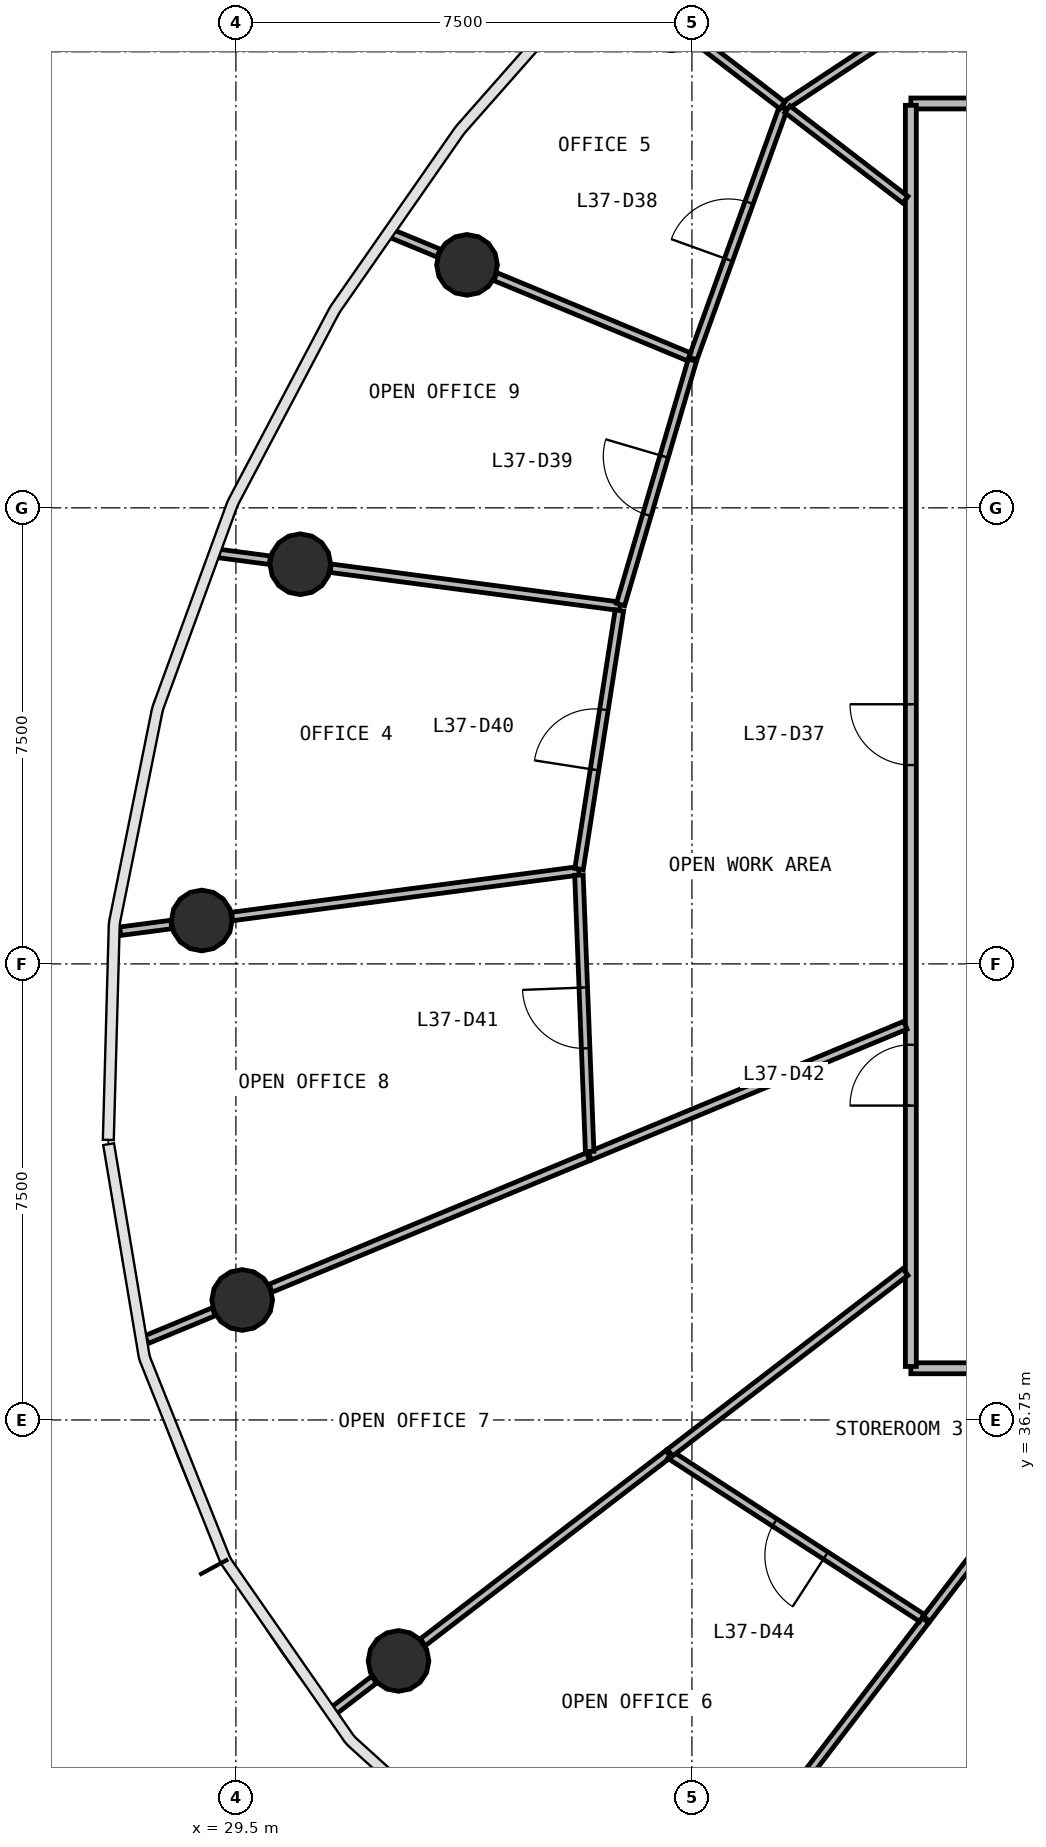
"""IFC4 building model, lengths in metres.
Left out: names, types, materials, properties, quantities, classifications, styles, units other than length and angle.
Written with IfcOpenShell. Run it as: python <this file> out.ifc"""

import sys

from ifc_helpers import new_model, si_unit, direction, frame, frame_2d, origin, origin_2d, place, context, subcontext, project, spatial, rectangle, circle, extrude, source, transform, mapped, element, fill, save


model = new_model("IFC4")
c1 = context("Model", 3, precision=1e-05, world=origin(), true_north=direction((0.0, 1.0)))
c2 = subcontext(c1, "Body", "Model", "MODEL_VIEW")
j1 = project(units=[si_unit("LENGTHUNIT", "METRE"), si_unit("PLANEANGLEUNIT", "RADIAN")], contexts=[c1])
p1 = place(None, origin())
s1 = spatial("IfcSite", under=j1, at=p1, CompositionType="ELEMENT")
p2 = place(p1, origin())
s2 = spatial("IfcBuilding", under=s1, at=p2, CompositionType="ELEMENT")
p3 = place(p2, frame((0.0, 0.0, 156.5)))
s3 = spatial("IfcBuildingStorey", under=s2, at=p3, CompositionType="ELEMENT", Elevation=156.5)
m1 = source(origin(), c2, "Body", "SweptSolid", [
    extrude(circle(Radius=0.5, at=origin_2d()), origin(), (0.0, 0.0, 1.0), 3.9),
])
for number, where, z_axis, x_axis in (
    (1, (33.301, 55.746, 0.0), (0.0, 0.0, 1.0), (1.0, 0.0, 0.0)),
    (2, (30.559, 50.823, 0.0), (0.0, 0.0, 1.0), (1.0, 0.0, 0.0)),
    (3, (28.938, 44.964, 0.0), (0.0, 0.0, 1.0), (1.0, 0.0, 0.0)),
    (4, (29.603, 38.723, 0.0), (0.0, 0.0, 1.0), (1.0, 0.0, 0.0)),
    (5, (32.174, 32.787, 0.0), (0.0, 0.0, 1.0), (1.0, 0.0, 0.0)),
):
    element("IfcColumn", number, at=place(p3, frame(where, z_axis=z_axis, x_axis=x_axis)), inside=s3, PredefinedType="COLUMN", context=c2, shape_type="MappedRepresentation", body=[
        mapped(m1, transform((0.0, 0.0, 0.0), scale=1.0)),
    ])
p4 = place(p3, frame((40.6, 58.4, 0.0), z_axis=(0.0, 0.0, 1.0), x_axis=(1.0, 0.0, 0.0)))
e6 = element("IfcWall", 6, at=p4, inside=s3, PredefinedType="PARTITIONING", context=c2, shape_type="SweptSolid", body=[
    extrude(rectangle(XDim=22.8, YDim=0.18, at=frame_2d((11.4, 0.0))), origin(), (0.0, 0.0, 1.0), 2.88),
])
p5 = place(p4, frame((12.95, 0.0, 0.0)))
e7 = element("IfcOpeningElement", 7, at=p5, cuts=e6, PredefinedType="OPENING", context=c2, shape_type="SweptSolid", body=[
    extrude(rectangle(XDim=1.0, YDim=2.1, at=frame_2d((0.5, 1.05))), frame((0.0, 0.1, 0.0), z_axis=(0.0, -1.0, 0.0), x_axis=(1.0, 0.0, 0.0)), (0.0, 0.0, 1.0), 0.2),
])
p6 = place(p4, frame((10.95, 0.0, 0.0)))
e8 = element("IfcOpeningElement", 8, at=p6, cuts=e6, PredefinedType="OPENING", context=c2, shape_type="SweptSolid", body=[
    extrude(rectangle(XDim=1.0, YDim=2.1, at=frame_2d((0.5, 1.05))), frame((0.0, 0.1, 0.0), z_axis=(0.0, -1.0, 0.0), x_axis=(1.0, 0.0, 0.0)), (0.0, 0.0, 1.0), 0.2),
])
p7 = place(p3, frame((63.4, 37.6, 0.0), z_axis=(0.0, 0.0, 1.0), x_axis=(-1.0, 0.0, 0.0)))
e9 = element("IfcWall", 9, at=p7, inside=s3, PredefinedType="PARTITIONING", context=c2, shape_type="SweptSolid", body=[
    extrude(rectangle(XDim=22.8, YDim=0.18, at=frame_2d((11.4, 0.0))), origin(), (0.0, 0.0, 1.0), 2.88),
])
p8 = place(p7, frame((16.05, 0.0, 0.0)))
e10 = element("IfcOpeningElement", 10, at=p8, cuts=e9, PredefinedType="OPENING", context=c2, shape_type="SweptSolid", body=[
    extrude(rectangle(XDim=0.9, YDim=2.1, at=frame_2d((0.45, 1.05))), frame((0.0, 0.1, 0.0), z_axis=(0.0, -1.0, 0.0), x_axis=(1.0, 0.0, 0.0)), (0.0, 0.0, 1.0), 0.2),
])
p9 = place(p7, frame((13.05, 0.0, 0.0)))
e11 = element("IfcOpeningElement", 11, at=p9, cuts=e9, PredefinedType="OPENING", context=c2, shape_type="SweptSolid", body=[
    extrude(rectangle(XDim=0.9, YDim=2.1, at=frame_2d((0.45, 1.05))), frame((0.0, 0.1, 0.0), z_axis=(0.0, -1.0, 0.0), x_axis=(1.0, 0.0, 0.0)), (0.0, 0.0, 1.0), 0.2),
])
p10 = place(p7, frame((10.95, 0.0, 0.0)))
e12 = element("IfcOpeningElement", 12, at=p10, cuts=e9, PredefinedType="OPENING", context=c2, shape_type="SweptSolid", body=[
    extrude(rectangle(XDim=1.0, YDim=2.1, at=frame_2d((0.5, 1.05))), frame((0.0, 0.1, 0.0), z_axis=(0.0, -1.0, 0.0), x_axis=(1.0, 0.0, 0.0)), (0.0, 0.0, 1.0), 0.2),
])
p11 = place(p7, frame((19.95, 0.0, 0.0)))
e13 = element("IfcOpeningElement", 13, at=p11, cuts=e9, PredefinedType="OPENING", context=c2, shape_type="SweptSolid", body=[
    extrude(rectangle(XDim=1.0, YDim=2.1, at=frame_2d((0.5, 1.05))), frame((0.0, 0.1, 0.0), z_axis=(0.0, -1.0, 0.0), x_axis=(1.0, 0.0, 0.0)), (0.0, 0.0, 1.0), 0.2),
])
p12 = place(p3, frame((40.6, 37.63, 0.0), z_axis=(0.0, 0.0, 1.0), x_axis=(0.0, 1.0, 0.0)))
e14 = element("IfcWall", 14, at=p12, inside=s3, PredefinedType="PARTITIONING", context=c2, shape_type="SweptSolid", body=[
    extrude(rectangle(XDim=20.74, YDim=0.18, at=frame_2d((10.37, 0.0))), origin(), (0.0, 0.0, 1.0), 2.88),
])
p13 = place(p12, frame((9.89, 0.0, 0.0)))
e15 = element("IfcOpeningElement", 15, at=p13, cuts=e14, PredefinedType="OPENING", context=c2, shape_type="SweptSolid", body=[
    extrude(rectangle(XDim=1.0, YDim=2.1, at=frame_2d((0.5, 1.05))), frame((0.0, 0.1, 0.0), z_axis=(0.0, -1.0, 0.0), x_axis=(1.0, 0.0, 0.0)), (0.0, 0.0, 1.0), 0.2),
])
p14 = place(p12, frame((4.29, 0.0, 0.0)))
e16 = element("IfcOpeningElement", 16, at=p14, cuts=e14, PredefinedType="OPENING", context=c2, shape_type="SweptSolid", body=[
    extrude(rectangle(XDim=1.0, YDim=2.1, at=frame_2d((0.5, 1.05))), frame((0.0, 0.1, 0.0), z_axis=(0.0, -1.0, 0.0), x_axis=(1.0, 0.0, 0.0)), (0.0, 0.0, 1.0), 0.2),
])
p15 = place(p3, frame((35.139, 45.78, 0.0), z_axis=(0.0, 0.0, 1.0), x_axis=(-0.99144533292, -0.130522610424, 0.0)))
e17 = element("IfcWall", 17, at=p15, inside=s3, PredefinedType="PARTITIONING", context=c2, shape_type="SweptSolid", body=[
    extrude(rectangle(XDim=5.75, YDim=0.14, at=frame_2d((2.875, 0.0))), origin(), (0.0, 0.0, 1.0), 2.88),
])
p16 = place(p3, frame((40.51, 43.241, 0.0), z_axis=(0.0, 0.0, 1.0), x_axis=(-0.92387220975, -0.382701110597, 0.0)))
e18 = element("IfcWall", 18, at=p16, inside=s3, PredefinedType="PARTITIONING", context=c2, shape_type="SweptSolid", body=[
    extrude(rectangle(XDim=5.617, YDim=0.14, at=frame_2d((2.809, 0.0))), origin(), (0.0, 0.0, 1.0), 2.88),
])
p17 = place(p3, frame((35.293, 41.08, 0.0), z_axis=(0.0, 0.0, 1.0), x_axis=(-0.923883666289, -0.38267345239, 0.0)))
e19 = element("IfcWall", 19, at=p17, inside=s3, PredefinedType="PARTITIONING", context=c2, shape_type="SweptSolid", body=[
    extrude(rectangle(XDim=5.653, YDim=0.14, at=frame_2d((2.827, 0.0))), origin(), (0.0, 0.0, 1.0), 2.88),
])
p18 = place(p3, frame((40.841, 33.457, 0.0), z_axis=(0.0, 0.0, 1.0), x_axis=(-0.608780216018, -0.793338924159, 0.0)))
e20 = element("IfcWall", 20, at=p18, inside=s3, PredefinedType="PARTITIONING", context=c2, shape_type="SweptSolid", body=[
    extrude(rectangle(XDim=5.188, YDim=0.14, at=frame_2d((2.594, 0.0))), origin(), (0.0, 0.0, 1.0), 2.88),
])
p19 = place(p3, frame((36.614, 36.194, 0.0), z_axis=(0.0, 0.0, 1.0), x_axis=(-0.79337017358, -0.608739490811, 0.0)))
e21 = element("IfcWall", 21, at=p19, inside=s3, PredefinedType="PARTITIONING", context=c2, shape_type="SweptSolid", body=[
    extrude(rectangle(XDim=5.092, YDim=0.14, at=frame_2d((2.546, 0.0))), origin(), (0.0, 0.0, 1.0), 2.88),
])
p20 = place(p3, frame((40.782, 33.495, 0.0), z_axis=(0.0, 0.0, 1.0), x_axis=(-0.839336490457, 0.543612229247, 0.0)))
e22 = element("IfcWall", 22, at=p20, inside=s3, PredefinedType="PARTITIONING", context=c2, shape_type="SweptSolid", body=[
    extrude(rectangle(XDim=4.935, YDim=0.14, at=frame_2d((2.468, 0.0))), origin(), (0.0, 0.0, 1.0), 2.88),
])
p21 = place(p20, frame((1.885, 0.0, 0.0)))
e23 = element("IfcOpeningElement", 23, at=p21, cuts=e22, PredefinedType="OPENING", context=c2, shape_type="SweptSolid", body=[
    extrude(rectangle(XDim=1.0, YDim=2.1, at=frame_2d((0.5, 1.05))), frame((0.0, 0.08, 0.0), z_axis=(0.0, -1.0, 0.0), x_axis=(1.0, 0.0, 0.0)), (0.0, 0.0, 1.0), 0.16),
])
p22 = place(p3, frame((40.51, 39.183, 0.0), z_axis=(0.0, 0.0, 1.0), x_axis=(-0.793354275357, -0.608760210405, 0.0)))
e24 = element("IfcWall", 24, at=p22, inside=s3, PredefinedType="PARTITIONING", context=c2, shape_type="SweptSolid", body=[
    extrude(rectangle(XDim=4.88, YDim=0.14, at=frame_2d((2.44, 0.0))), origin(), (0.0, 0.0, 1.0), 2.88),
])
p23 = place(p3, frame((35.817, 50.131, 0.0), z_axis=(0.0, 0.0, 1.0), x_axis=(-0.991450832312, 0.13048083042, 0.0)))
e25 = element("IfcWall", 25, at=p23, inside=s3, PredefinedType="PARTITIONING", context=c2, shape_type="SweptSolid", body=[
    extrude(rectangle(XDim=4.799, YDim=0.14, at=frame_2d((2.4, 0.0))), origin(), (0.0, 0.0, 1.0), 2.88),
])
p24 = place(p3, frame((35.318, 41.166, 0.0), z_axis=(0.0, 0.0, 1.0), x_axis=(-0.038760942668, 0.999248512295, 0.0)))
e26 = element("IfcWall", 26, at=p24, inside=s3, PredefinedType="PARTITIONING", context=c2, shape_type="SweptSolid", body=[
    extrude(rectangle(XDim=4.548, YDim=0.14, at=frame_2d((2.274, 0.0))), origin(), (0.0, 0.0, 1.0), 2.88),
])
p25 = place(p24, frame((1.698, 0.0, 0.0)))
e27 = element("IfcOpeningElement", 27, at=p25, cuts=e26, PredefinedType="OPENING", context=c2, shape_type="SweptSolid", body=[
    extrude(rectangle(XDim=1.0, YDim=2.1, at=frame_2d((0.5, 1.05))), frame((0.0, 0.08, 0.0), z_axis=(0.0, -1.0, 0.0), x_axis=(1.0, 0.0, 0.0)), (0.0, 0.0, 1.0), 0.16),
])
p26 = place(p3, frame((38.511, 58.351, 0.0), z_axis=(0.0, 0.0, 1.0), x_axis=(0.834612459485, 0.550837582662, 0.0)))
e28 = element("IfcWall", 28, at=p26, inside=s3, PredefinedType="PARTITIONING", context=c2, shape_type="SweptSolid", body=[
    extrude(rectangle(XDim=4.412, YDim=0.14, at=frame_2d((2.206, 0.0))), origin(), (0.0, 0.0, 1.0), 2.88),
])
p27 = place(p26, frame((1.762, 0.0, 0.0)))
e29 = element("IfcOpeningElement", 29, at=p27, cuts=e28, PredefinedType="OPENING", context=c2, shape_type="SweptSolid", body=[
    extrude(rectangle(XDim=1.0, YDim=2.1, at=frame_2d((0.5, 1.05))), frame((0.0, 0.08, 0.0), z_axis=(0.0, -1.0, 0.0), x_axis=(1.0, 0.0, 0.0)), (0.0, 0.0, 1.0), 0.16),
])
p28 = place(p3, frame((37.016, 54.207, 0.0), z_axis=(0.0, 0.0, 1.0), x_axis=(0.339349662801, 0.940660303381, 0.0)))
e30 = element("IfcWall", 30, at=p28, inside=s3, PredefinedType="PARTITIONING", context=c2, shape_type="SweptSolid", body=[
    extrude(rectangle(XDim=4.376, YDim=0.14, at=frame_2d((2.188, 0.0))), origin(), (0.0, 0.0, 1.0), 2.88),
])
p29 = place(p28, frame((1.725, 0.0, 0.0)))
e31 = element("IfcOpeningElement", 31, at=p29, cuts=e30, PredefinedType="OPENING", context=c2, shape_type="SweptSolid", body=[
    extrude(rectangle(XDim=1.0, YDim=2.1, at=frame_2d((0.5, 1.05))), frame((0.0, 0.08, 0.0), z_axis=(0.0, -1.0, 0.0), x_axis=(1.0, 0.0, 0.0)), (0.0, 0.0, 1.0), 0.16),
])
p30 = place(p3, frame((35.143, 45.81, 0.0), z_axis=(0.0, 0.0, 1.0), x_axis=(0.154158792567, 0.988046085299, 0.0)))
e32 = element("IfcWall", 32, at=p30, inside=s3, PredefinedType="PARTITIONING", context=c2, shape_type="SweptSolid", body=[
    extrude(rectangle(XDim=4.303, YDim=0.14, at=frame_2d((2.151, 0.0))), origin(), (0.0, 0.0, 1.0), 2.88),
])
p31 = place(p30, frame((1.653, 0.0, 0.0)))
e33 = element("IfcOpeningElement", 33, at=p31, cuts=e32, PredefinedType="OPENING", context=c2, shape_type="SweptSolid", body=[
    extrude(rectangle(XDim=1.0, YDim=2.1, at=frame_2d((0.5, 1.05))), frame((0.0, 0.08, 0.0), z_axis=(0.0, -1.0, 0.0), x_axis=(1.0, 0.0, 0.0)), (0.0, 0.0, 1.0), 0.16),
])
p32 = place(p3, frame((35.826, 50.159, 0.0), z_axis=(0.0, 0.0, 1.0), x_axis=(0.28208743745, 0.959388699971, 0.0)))
e34 = element("IfcWall", 34, at=p32, inside=s3, PredefinedType="PARTITIONING", context=c2, shape_type="SweptSolid", body=[
    extrude(rectangle(XDim=4.189, YDim=0.14, at=frame_2d((2.094, 0.0))), origin(), (0.0, 0.0, 1.0), 2.88),
])
p33 = place(p32, frame((1.539, 0.0, 0.0)))
e35 = element("IfcOpeningElement", 35, at=p33, cuts=e34, PredefinedType="OPENING", context=c2, shape_type="SweptSolid", body=[
    extrude(rectangle(XDim=1.0, YDim=2.1, at=frame_2d((0.5, 1.05))), frame((0.0, 0.08, 0.0), z_axis=(0.0, -1.0, 0.0), x_axis=(1.0, 0.0, 0.0)), (0.0, 0.0, 1.0), 0.16),
])
p34 = place(p3, frame((36.951, 54.233, 0.0), z_axis=(0.0, 0.0, 1.0), x_axis=(-0.923873497733, 0.382698001285, 0.0)))
e36 = element("IfcWall", 36, at=p34, inside=s3, PredefinedType="PARTITIONING", context=c2, shape_type="SweptSolid", body=[
    extrude(rectangle(XDim=3.446, YDim=0.14, at=frame_2d((1.723, 0.0))), origin(), (0.0, 0.0, 1.0), 2.88),
])
p35 = place(p3, frame((40.51, 56.817, 0.0), z_axis=(0.0, 0.0, 1.0), x_axis=(-0.793387804713, 0.608716511467, 0.0)))
e37 = element("IfcWall", 37, at=p35, inside=s3, PredefinedType="PARTITIONING", context=c2, shape_type="SweptSolid", body=[
    extrude(rectangle(XDim=2.446, YDim=0.14, at=frame_2d((1.223, 0.0))), origin(), (0.0, 0.0, 1.0), 2.88),
])
p36 = place(p3, frame((42.033, 35.011, 0.0), z_axis=(0.0, 0.0, 1.0), x_axis=(-0.608750262105, -0.793361908833, 0.0)))
e38 = element("IfcWall", 38, at=p36, inside=s3, PredefinedType="PARTITIONING", context=c2, shape_type="SweptSolid", body=[
    extrude(rectangle(XDim=1.929, YDim=0.14, at=frame_2d((0.965, 0.0))), origin(), (0.0, 0.0, 1.0), 2.88),
])
p37 = place(p3, frame((38.487, 58.369, 0.0), z_axis=(0.0, 0.0, 1.0), x_axis=(-0.793336842099, 0.608782929269, 0.0)))
e39 = element("IfcWall", 39, at=p37, inside=s3, PredefinedType="PARTITIONING", context=c2, shape_type="SweptSolid", body=[
    extrude(rectangle(XDim=1.794, YDim=0.14, at=frame_2d((0.897, 0.0))), origin(), (0.0, 0.0, 1.0), 2.88),
])
p38 = place(p3, frame((29.137, 38.53, 0.0), z_axis=(0.0, 0.0, 1.0), x_axis=(-0.923882723383, -0.382675728829, 0.0)))
e40 = element("IfcWall", 40, at=p38, inside=s3, PredefinedType="PARTITIONING", context=c2, shape_type="SweptSolid", body=[
    extrude(rectangle(XDim=1.198, YDim=0.14, at=frame_2d((0.599, 0.0))), origin(), (0.0, 0.0, 1.0), 2.88),
])
p39 = place(p3, frame((30.059, 50.889, 0.0), z_axis=(0.0, 0.0, 1.0), x_axis=(-0.991446500326, 0.130513742537, 0.0)))
e41 = element("IfcWall", 41, at=p39, inside=s3, PredefinedType="PARTITIONING", context=c2, shape_type="SweptSolid", body=[
    extrude(rectangle(XDim=0.853, YDim=0.14, at=frame_2d((0.427, 0.0))), origin(), (0.0, 0.0, 1.0), 2.88),
])
p40 = place(p3, frame((28.438, 44.898, 0.0), z_axis=(0.0, 0.0, 1.0), x_axis=(-0.991432738393, -0.130618242377, 0.0)))
e42 = element("IfcWall", 42, at=p40, inside=s3, PredefinedType="PARTITIONING", context=c2, shape_type="SweptSolid", body=[
    extrude(rectangle(XDim=0.849, YDim=0.14, at=frame_2d((0.424, 0.0))), origin(), (0.0, 0.0, 1.0), 2.88),
])
p41 = place(p3, frame((31.774, 32.48, 0.0), z_axis=(0.0, 0.0, 1.0), x_axis=(-0.793296212725, -0.608835871871, 0.0)))
e43 = element("IfcWall", 43, at=p41, inside=s3, PredefinedType="PARTITIONING", context=c2, shape_type="SweptSolid", body=[
    extrude(rectangle(XDim=0.836, YDim=0.14, at=frame_2d((0.418, 0.0))), origin(), (0.0, 0.0, 1.0), 2.88),
])
p42 = place(p3, frame((32.834, 55.939, 0.0), z_axis=(0.0, 0.0, 1.0), x_axis=(-0.923909393783, 0.382611332921, 0.0)))
e44 = element("IfcWall", 44, at=p42, inside=s3, PredefinedType="PARTITIONING", context=c2, shape_type="SweptSolid", body=[
    extrude(rectangle(XDim=0.831, YDim=0.14, at=frame_2d((0.416, 0.0))), origin(), (0.0, 0.0, 1.0), 2.88),
])
m2 = source(origin(), c2, "Body", "SweptSolid", [
    extrude(rectangle(XDim=1.0, YDim=2.1, at=frame_2d((0.5, 1.05))), frame((0.0, 0.025, 0.0), z_axis=(0.0, -1.0, 0.0), x_axis=(1.0, 0.0, 0.0)), (0.0, 0.0, 1.0), 0.05),
])
p43 = place(p13, origin())
e45 = element("IfcDoor", 45, at=p43, inside=s3, OperationType="SINGLE_SWING_RIGHT", PredefinedType="DOOR", context=c2, shape_type="MappedRepresentation", body=[
    mapped(m2, transform((0.0, 0.0, 0.0), scale=1.0)),
])
fill(e15, e45)
p44 = place(p29, origin())
e46 = element("IfcDoor", 46, at=p44, inside=s3, OperationType="SINGLE_SWING_LEFT", PredefinedType="DOOR", context=c2, shape_type="MappedRepresentation", body=[
    mapped(m2, transform((0.0, 0.0, 0.0), scale=1.0)),
])
fill(e31, e46)
p45 = place(p33, origin())
e47 = element("IfcDoor", 47, at=p45, inside=s3, OperationType="SINGLE_SWING_RIGHT", PredefinedType="DOOR", context=c2, shape_type="MappedRepresentation", body=[
    mapped(m2, transform((0.0, 0.0, 0.0), scale=1.0)),
])
fill(e35, e47)
p46 = place(p31, origin())
e48 = element("IfcDoor", 48, at=p46, inside=s3, OperationType="SINGLE_SWING_LEFT", PredefinedType="DOOR", context=c2, shape_type="MappedRepresentation", body=[
    mapped(m2, transform((0.0, 0.0, 0.0), scale=1.0)),
])
fill(e33, e48)
p47 = place(p25, origin())
e49 = element("IfcDoor", 49, at=p47, inside=s3, OperationType="SINGLE_SWING_RIGHT", PredefinedType="DOOR", context=c2, shape_type="MappedRepresentation", body=[
    mapped(m2, transform((0.0, 0.0, 0.0), scale=1.0)),
])
fill(e27, e49)
p48 = place(p14, origin())
e50 = element("IfcDoor", 50, at=p48, inside=s3, OperationType="SINGLE_SWING_LEFT", PredefinedType="DOOR", context=c2, shape_type="MappedRepresentation", body=[
    mapped(m2, transform((0.0, 0.0, 0.0), scale=1.0)),
])
fill(e16, e50)
p49 = place(p21, origin())
e51 = element("IfcDoor", 51, at=p49, inside=s3, OperationType="SINGLE_SWING_LEFT", PredefinedType="DOOR", context=c2, shape_type="MappedRepresentation", body=[
    mapped(m2, transform((0.0, 0.0, 0.0), scale=1.0)),
])
fill(e23, e51)
save(model, sys.argv[1])
